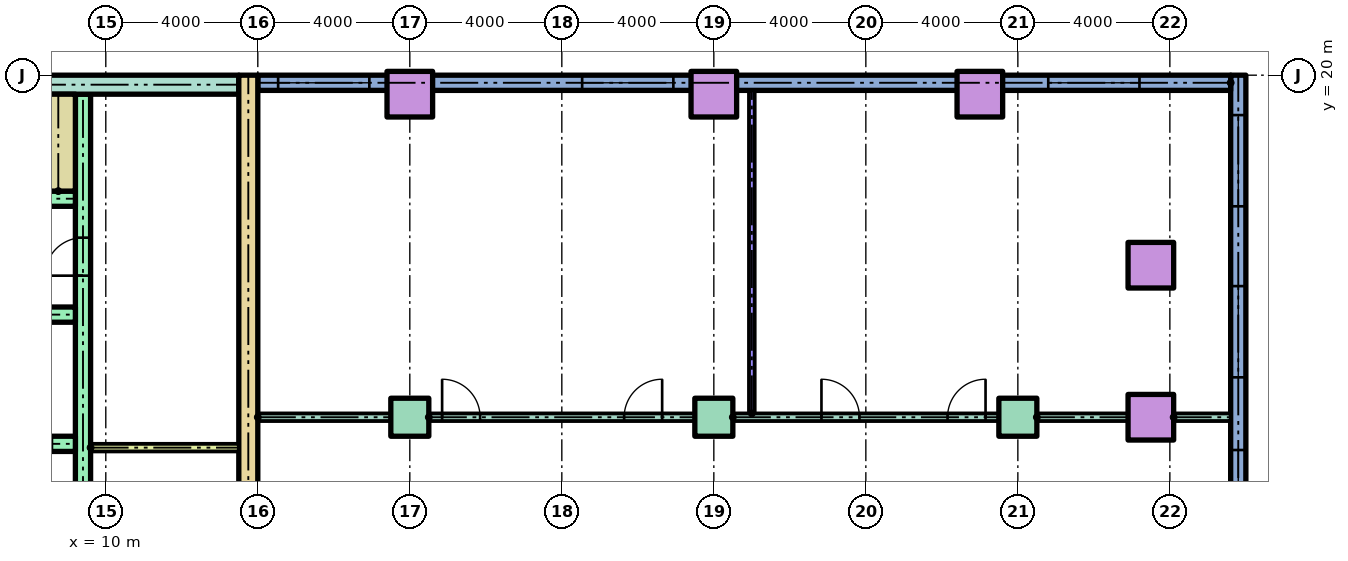
"""IFC4 building model, lengths in metres.
Left out: names, types, materials, properties, quantities, classifications, styles, units other than length and angle.
Written with IfcOpenShell. Run it as: python <this file> out.ifc"""

import sys

from ifc_helpers import new_model, si_unit, direction, frame, frame_2d, origin, origin_2d, place, context, subcontext, project, spatial, rectangle, hollow_rectangle, extrude, element, fill, save


model = new_model("IFC4")
c1 = context("Model", 3, precision=1e-05, world=origin(), true_north=direction((0.0, 1.0)))
c2 = subcontext(c1, "Body", "Model", "MODEL_VIEW")
j1 = project(units=[si_unit("LENGTHUNIT", "METRE"), si_unit("PLANEANGLEUNIT", "RADIAN")], contexts=[c1])
p1 = place(None, origin())
s1 = spatial("IfcSite", under=j1, at=p1, CompositionType="ELEMENT")
p2 = place(p1, origin())
s2 = spatial("IfcBuilding", under=s1, at=p2, CompositionType="ELEMENT")
p3 = place(p2, frame((0.0, 0.0, 18.0)))
s3 = spatial("IfcBuildingStorey", under=s2, at=p3, CompositionType="ELEMENT", Elevation=18.0)
for number, where in (
    (1, (18.0, 11.0, 0.0)),
    (2, (26.0, 11.0, 0.0)),
    (3, (34.0, 11.0, 0.0)),
):
    element("IfcColumn", number, at=place(p3, frame(where)), inside=s3, PredefinedType="COLUMN", context=c2, shape_type="SweptSolid", body=[
        extrude(rectangle(XDim=1.0, YDim=1.0, at=origin_2d()), origin(), (0.0, 0.0, 1.0), 4.0),
    ])
for number, where in (
    (4, (37.5, 11.0, 0.0)),
    (5, (37.5, 15.0, 0.0)),
    (6, (18.0, 19.5, 0.0)),
    (7, (26.0, 19.5, 0.0)),
    (8, (33.0, 19.5, 0.0)),
):
    element("IfcColumn", number, at=place(p3, frame(where)), inside=s3, PredefinedType="COLUMN", context=c2, shape_type="SweptSolid", body=[
        extrude(hollow_rectangle(XDim=1.2, YDim=1.2, WallThickness=0.06, at=origin_2d()), origin(), (0.0, 0.0, 1.0), 4.0),
    ])
p4 = place(p3, frame((39.8, -50.0, 0.0), z_axis=(0.0, 0.0, 1.0), x_axis=(0.0, 1.0, 0.0)))
e9 = element("IfcWall", 9, at=p4, inside=s3, PredefinedType="STANDARD", context=c2, shape_type="SweptSolid", body=[
    extrude(rectangle(XDim=70.0, YDim=0.4, at=frame_2d((35.0, 0.0))), origin(), (0.0, 0.0, 1.0), 3.7),
])
p5 = place(p4, frame((0.75, 0.0, 0.9)))
e10 = element("IfcOpeningElement", 10, at=p5, cuts=e9, PredefinedType="OPENING", context=c2, shape_type="SweptSolid", body=[
    extrude(rectangle(XDim=2.4, YDim=2.1, at=frame_2d((1.2, 1.05))), frame((0.0, 0.21, 0.0), z_axis=(0.0, -1.0, 0.0), x_axis=(1.0, 0.0, 0.0)), (0.0, 0.0, 1.0), 0.42),
])
p6 = place(p4, frame((6.55, 0.0, 0.9)))
e11 = element("IfcOpeningElement", 11, at=p6, cuts=e9, PredefinedType="OPENING", context=c2, shape_type="SweptSolid", body=[
    extrude(rectangle(XDim=2.4, YDim=2.1, at=frame_2d((1.2, 1.05))), frame((0.0, 0.21, 0.0), z_axis=(0.0, -1.0, 0.0), x_axis=(1.0, 0.0, 0.0)), (0.0, 0.0, 1.0), 0.42),
])
p7 = place(p4, frame((10.05, 0.0, 0.9)))
e12 = element("IfcOpeningElement", 12, at=p7, cuts=e9, PredefinedType="OPENING", context=c2, shape_type="SweptSolid", body=[
    extrude(rectangle(XDim=2.4, YDim=2.1, at=frame_2d((1.2, 1.05))), frame((0.0, 0.21, 0.0), z_axis=(0.0, -1.0, 0.0), x_axis=(1.0, 0.0, 0.0)), (0.0, 0.0, 1.0), 0.42),
])
p8 = place(p4, frame((13.55, 0.0, 0.9)))
e13 = element("IfcOpeningElement", 13, at=p8, cuts=e9, PredefinedType="OPENING", context=c2, shape_type="SweptSolid", body=[
    extrude(rectangle(XDim=2.4, YDim=2.1, at=frame_2d((1.2, 1.05))), frame((0.0, 0.21, 0.0), z_axis=(0.0, -1.0, 0.0), x_axis=(1.0, 0.0, 0.0)), (0.0, 0.0, 1.0), 0.42),
])
p9 = place(p4, frame((28.863, 0.0, 0.9)))
e14 = element("IfcOpeningElement", 14, at=p9, cuts=e9, PredefinedType="OPENING", context=c2, shape_type="SweptSolid", body=[
    extrude(rectangle(XDim=2.4, YDim=2.1, at=frame_2d((1.2, 1.05))), frame((0.0, 0.21, 0.0), z_axis=(0.0, -1.0, 0.0), x_axis=(1.0, 0.0, 0.0)), (0.0, 0.0, 1.0), 0.42),
])
p10 = place(p4, frame((32.988, 0.0, 0.9)))
e15 = element("IfcOpeningElement", 15, at=p10, cuts=e9, PredefinedType="OPENING", context=c2, shape_type="SweptSolid", body=[
    extrude(rectangle(XDim=2.4, YDim=2.1, at=frame_2d((1.2, 1.05))), frame((0.0, 0.21, 0.0), z_axis=(0.0, -1.0, 0.0), x_axis=(1.0, 0.0, 0.0)), (0.0, 0.0, 1.0), 0.42),
])
p11 = place(p4, frame((37.113, 0.0, 0.9)))
e16 = element("IfcOpeningElement", 16, at=p11, cuts=e9, PredefinedType="OPENING", context=c2, shape_type="SweptSolid", body=[
    extrude(rectangle(XDim=2.4, YDim=2.1, at=frame_2d((1.2, 1.05))), frame((0.0, 0.21, 0.0), z_axis=(0.0, -1.0, 0.0), x_axis=(1.0, 0.0, 0.0)), (0.0, 0.0, 1.0), 0.42),
])
p12 = place(p4, frame((41.238, 0.0, 0.9)))
e17 = element("IfcOpeningElement", 17, at=p12, cuts=e9, PredefinedType="OPENING", context=c2, shape_type="SweptSolid", body=[
    extrude(rectangle(XDim=2.4, YDim=2.1, at=frame_2d((1.2, 1.05))), frame((0.0, 0.21, 0.0), z_axis=(0.0, -1.0, 0.0), x_axis=(1.0, 0.0, 0.0)), (0.0, 0.0, 1.0), 0.42),
])
p13 = place(p4, frame((45.363, 0.0, 0.9)))
e18 = element("IfcOpeningElement", 18, at=p13, cuts=e9, PredefinedType="OPENING", context=c2, shape_type="SweptSolid", body=[
    extrude(rectangle(XDim=2.4, YDim=2.1, at=frame_2d((1.2, 1.05))), frame((0.0, 0.21, 0.0), z_axis=(0.0, -1.0, 0.0), x_axis=(1.0, 0.0, 0.0)), (0.0, 0.0, 1.0), 0.42),
])
p14 = place(p4, frame((49.488, 0.0, 0.9)))
e19 = element("IfcOpeningElement", 19, at=p14, cuts=e9, PredefinedType="OPENING", context=c2, shape_type="SweptSolid", body=[
    extrude(rectangle(XDim=2.4, YDim=2.1, at=frame_2d((1.2, 1.05))), frame((0.0, 0.21, 0.0), z_axis=(0.0, -1.0, 0.0), x_axis=(1.0, 0.0, 0.0)), (0.0, 0.0, 1.0), 0.42),
])
p15 = place(p4, frame((53.613, 0.0, 0.9)))
e20 = element("IfcOpeningElement", 20, at=p15, cuts=e9, PredefinedType="OPENING", context=c2, shape_type="SweptSolid", body=[
    extrude(rectangle(XDim=2.4, YDim=2.1, at=frame_2d((1.2, 1.05))), frame((0.0, 0.21, 0.0), z_axis=(0.0, -1.0, 0.0), x_axis=(1.0, 0.0, 0.0)), (0.0, 0.0, 1.0), 0.42),
])
p16 = place(p4, frame((57.738, 0.0, 0.9)))
e21 = element("IfcOpeningElement", 21, at=p16, cuts=e9, PredefinedType="OPENING", context=c2, shape_type="SweptSolid", body=[
    extrude(rectangle(XDim=2.4, YDim=2.1, at=frame_2d((1.2, 1.05))), frame((0.0, 0.21, 0.0), z_axis=(0.0, -1.0, 0.0), x_axis=(1.0, 0.0, 0.0)), (0.0, 0.0, 1.0), 0.42),
])
p17 = place(p4, frame((62.05, 0.0, 0.9)))
e22 = element("IfcOpeningElement", 22, at=p17, cuts=e9, PredefinedType="OPENING", context=c2, shape_type="SweptSolid", body=[
    extrude(rectangle(XDim=2.4, YDim=2.1, at=frame_2d((1.2, 1.05))), frame((0.0, 0.21, 0.0), z_axis=(0.0, -1.0, 0.0), x_axis=(1.0, 0.0, 0.0)), (0.0, 0.0, 1.0), 0.42),
])
p18 = place(p4, frame((66.55, 0.0, 0.9)))
e23 = element("IfcOpeningElement", 23, at=p18, cuts=e9, PredefinedType="OPENING", context=c2, shape_type="SweptSolid", body=[
    extrude(rectangle(XDim=2.4, YDim=2.1, at=frame_2d((1.2, 1.05))), frame((0.0, 0.21, 0.0), z_axis=(0.0, -1.0, 0.0), x_axis=(1.0, 0.0, 0.0)), (0.0, 0.0, 1.0), 0.42),
])
p19 = place(p3, frame((39.6, 19.8, 0.0), z_axis=(0.0, 0.0, 1.0), x_axis=(-1.0, 0.0, 0.0)))
e24 = element("IfcWall", 24, at=p19, inside=s3, PredefinedType="STANDARD", context=c2, shape_type="SweptSolid", body=[
    extrude(rectangle(XDim=25.6, YDim=0.4, at=frame_2d((12.8, 0.0))), origin(), (0.0, 0.0, 1.0), 3.7),
])
p20 = place(p19, frame((2.4, 0.0, 0.9)))
e25 = element("IfcOpeningElement", 25, at=p20, cuts=e24, PredefinedType="OPENING", context=c2, shape_type="SweptSolid", body=[
    extrude(rectangle(XDim=2.4, YDim=2.1, at=frame_2d((1.2, 1.05))), frame((0.0, 0.21, 0.0), z_axis=(0.0, -1.0, 0.0), x_axis=(1.0, 0.0, 0.0)), (0.0, 0.0, 1.0), 0.42),
])
p21 = place(p19, frame((14.665, 0.0, 0.9)))
e26 = element("IfcOpeningElement", 26, at=p21, cuts=e24, PredefinedType="OPENING", context=c2, shape_type="SweptSolid", body=[
    extrude(rectangle(XDim=2.4, YDim=2.1, at=frame_2d((1.2, 1.05))), frame((0.0, 0.21, 0.0), z_axis=(0.0, -1.0, 0.0), x_axis=(1.0, 0.0, 0.0)), (0.0, 0.0, 1.0), 0.42),
])
p22 = place(p19, frame((22.665, 0.0, 0.9)))
e27 = element("IfcOpeningElement", 27, at=p22, cuts=e24, PredefinedType="OPENING", context=c2, shape_type="SweptSolid", body=[
    extrude(rectangle(XDim=2.4, YDim=2.1, at=frame_2d((1.2, 1.05))), frame((0.0, 0.21, 0.0), z_axis=(0.0, -1.0, 0.0), x_axis=(1.0, 0.0, 0.0)), (0.0, 0.0, 1.0), 0.42),
])
p23 = place(p3, frame((13.75, 3.0, 0.0), z_axis=(0.0, 0.0, 1.0), x_axis=(0.0, 1.0, 0.0)))
e28 = element("IfcWall", 28, at=p23, inside=s3, PredefinedType="SHEAR", context=c2, shape_type="SweptSolid", body=[
    extrude(rectangle(XDim=17.0, YDim=0.5, at=frame_2d((8.5, 0.0))), origin(), (0.0, 0.0, 1.0), 3.7),
])
p24 = place(p3, frame((-13.5, 19.75, 0.0)))
e29 = element("IfcWall", 29, at=p24, inside=s3, PredefinedType="SHEAR", context=c2, shape_type="SweptSolid", body=[
    extrude(rectangle(XDim=27.0, YDim=0.5, at=frame_2d((13.5, 0.0))), origin(), (0.0, 0.0, 1.0), 3.7),
])
p25 = place(p3, frame((9.4, 6.8, 0.0), z_axis=(0.0, 0.0, 1.0), x_axis=(0.0, 1.0, 0.0)))
e30 = element("IfcWall", 30, at=p25, inside=s3, PredefinedType="SHEAR", context=c2, shape_type="SweptSolid", body=[
    extrude(rectangle(XDim=12.7, YDim=0.4, at=frame_2d((6.35, 0.0))), origin(), (0.0, 0.0, 1.0), 3.7),
])
p26 = place(p25, frame((1.15, 0.0, 0.0)))
e31 = element("IfcOpeningElement", 31, at=p26, cuts=e30, PredefinedType="OPENING", context=c2, shape_type="SweptSolid", body=[
    extrude(rectangle(XDim=1.0, YDim=2.1, at=frame_2d((0.5, 1.05))), frame((0.0, 0.21, 0.0), z_axis=(0.0, -1.0, 0.0), x_axis=(1.0, 0.0, 0.0)), (0.0, 0.0, 1.0), 0.42),
])
p27 = place(p25, frame((7.925, 0.0, 0.0)))
e32 = element("IfcOpeningElement", 32, at=p27, cuts=e30, PredefinedType="OPENING", context=c2, shape_type="SweptSolid", body=[
    extrude(rectangle(XDim=1.0, YDim=2.1, at=frame_2d((0.5, 1.05))), frame((0.0, 0.21, 0.0), z_axis=(0.0, -1.0, 0.0), x_axis=(1.0, 0.0, 0.0)), (0.0, 0.0, 1.0), 0.42),
])
p28 = place(p3, frame((1.2, 10.3, 0.0)))
e33 = element("IfcWall", 33, at=p28, inside=s3, PredefinedType="SHEAR", context=c2, shape_type="SweptSolid", body=[
    extrude(rectangle(XDim=8.0, YDim=0.4, at=frame_2d((4.0, 0.0))), origin(), (0.0, 0.0, 1.0), 3.7),
])
p29 = place(p28, frame((3.55, 0.0, 0.0)))
e34 = element("IfcOpeningElement", 34, at=p29, cuts=e33, PredefinedType="OPENING", context=c2, shape_type="SweptSolid", body=[
    extrude(rectangle(XDim=1.1, YDim=2.1, at=frame_2d((0.55, 1.05))), frame((0.0, 0.21, 0.0), z_axis=(0.0, -1.0, 0.0), x_axis=(1.0, 0.0, 0.0)), (0.0, 0.0, 1.0), 0.42),
])
p30 = place(p28, frame((6.283, 0.0, 0.0)))
e35 = element("IfcOpeningElement", 35, at=p30, cuts=e33, PredefinedType="OPENING", context=c2, shape_type="SweptSolid", body=[
    extrude(rectangle(XDim=1.1, YDim=2.1, at=frame_2d((0.55, 1.05))), frame((0.0, 0.21, 0.0), z_axis=(0.0, -1.0, 0.0), x_axis=(1.0, 0.0, 0.0)), (0.0, 0.0, 1.0), 0.42),
])
p31 = place(p28, frame((0.867, 0.0, 0.0)))
e36 = element("IfcOpeningElement", 36, at=p31, cuts=e33, PredefinedType="OPENING", context=c2, shape_type="SweptSolid", body=[
    extrude(rectangle(XDim=1.0, YDim=2.1, at=frame_2d((0.5, 1.05))), frame((0.0, 0.21, 0.0), z_axis=(0.0, -1.0, 0.0), x_axis=(1.0, 0.0, 0.0)), (0.0, 0.0, 1.0), 0.42),
])
p32 = place(p3, frame((1.2, 13.7, 0.0)))
e37 = element("IfcWall", 37, at=p32, inside=s3, PredefinedType="SHEAR", context=c2, shape_type="SweptSolid", body=[
    extrude(rectangle(XDim=8.0, YDim=0.4, at=frame_2d((4.0, 0.0))), origin(), (0.0, 0.0, 1.0), 3.7),
])
p33 = place(p3, frame((-9.2, 16.75, 0.0)))
e38 = element("IfcWall", 38, at=p33, inside=s3, PredefinedType="SHEAR", context=c2, shape_type="SweptSolid", body=[
    extrude(rectangle(XDim=18.4, YDim=0.4, at=frame_2d((9.2, 0.0))), origin(), (0.0, 0.0, 1.0), 3.7),
])
p34 = place(p33, frame((0.1, 0.0, 0.0)))
e39 = element("IfcOpeningElement", 39, at=p34, cuts=e38, PredefinedType="OPENING", context=c2, shape_type="SweptSolid", body=[
    extrude(rectangle(XDim=0.95, YDim=2.1, at=frame_2d((0.475, 1.05))), frame((0.0, 0.21, 0.0), z_axis=(0.0, -1.0, 0.0), x_axis=(1.0, 0.0, 0.0)), (0.0, 0.0, 1.0), 0.42),
])
p35 = place(p33, frame((6.1, 0.0, 0.0)))
e40 = element("IfcOpeningElement", 40, at=p35, cuts=e38, PredefinedType="OPENING", context=c2, shape_type="SweptSolid", body=[
    extrude(rectangle(XDim=0.95, YDim=2.1, at=frame_2d((0.475, 1.05))), frame((0.0, 0.21, 0.0), z_axis=(0.0, -1.0, 0.0), x_axis=(1.0, 0.0, 0.0)), (0.0, 0.0, 1.0), 0.42),
])
p36 = place(p33, frame((12.1, 0.0, 0.0)))
e41 = element("IfcOpeningElement", 41, at=p36, cuts=e38, PredefinedType="OPENING", context=c2, shape_type="SweptSolid", body=[
    extrude(rectangle(XDim=0.95, YDim=2.1, at=frame_2d((0.475, 1.05))), frame((0.0, 0.21, 0.0), z_axis=(0.0, -1.0, 0.0), x_axis=(1.0, 0.0, 0.0)), (0.0, 0.0, 1.0), 0.42),
])
p37 = place(p3, frame((8.75, 16.95, 0.0), z_axis=(0.0, 0.0, 1.0), x_axis=(0.0, 1.0, 0.0)))
e42 = element("IfcWall", 42, at=p37, inside=s3, PredefinedType="SHEAR", context=c2, shape_type="SweptSolid", body=[
    extrude(rectangle(XDim=2.55, YDim=0.9, at=frame_2d((1.275, 0.0))), origin(), (0.0, 0.0, 1.0), 3.7),
])
p38 = place(p3, frame((9.6, 10.2, 0.0)))
e43 = element("IfcWall", 43, at=p38, inside=s3, PredefinedType="PARTITIONING", context=c2, shape_type="SweptSolid", body=[
    extrude(rectangle(XDim=3.9, YDim=0.2, at=frame_2d((1.95, 0.0))), origin(), (0.0, 0.0, 1.0), 3.7),
])
p39 = place(p3, frame((14.0, 11.0, 0.0)))
e44 = element("IfcWall", 44, at=p39, inside=s3, PredefinedType="PARTITIONING", context=c2, shape_type="SweptSolid", body=[
    extrude(rectangle(XDim=3.5, YDim=0.2, at=frame_2d((1.75, 0.0))), origin(), (0.0, 0.0, 1.0), 3.7),
])
p40 = place(p3, frame((18.5, 11.0, 0.0)))
e45 = element("IfcWall", 45, at=p40, inside=s3, PredefinedType="PARTITIONING", context=c2, shape_type="SweptSolid", body=[
    extrude(rectangle(XDim=7.0, YDim=0.2, at=frame_2d((3.5, 0.0))), origin(), (0.0, 0.0, 1.0), 3.7),
])
p41 = place(p40, frame((0.35, 0.0, 0.0)))
e46 = element("IfcOpeningElement", 46, at=p41, cuts=e45, PredefinedType="OPENING", context=c2, shape_type="SweptSolid", body=[
    extrude(rectangle(XDim=1.0, YDim=2.1, at=frame_2d((0.5, 1.05))), frame((0.0, 0.11, 0.0), z_axis=(0.0, -1.0, 0.0), x_axis=(1.0, 0.0, 0.0)), (0.0, 0.0, 1.0), 0.22),
])
p42 = place(p40, frame((5.14, 0.0, 0.0)))
e47 = element("IfcOpeningElement", 47, at=p42, cuts=e45, PredefinedType="OPENING", context=c2, shape_type="SweptSolid", body=[
    extrude(rectangle(XDim=1.0, YDim=2.1, at=frame_2d((0.5, 1.05))), frame((0.0, 0.11, 0.0), z_axis=(0.0, -1.0, 0.0), x_axis=(1.0, 0.0, 0.0)), (0.0, 0.0, 1.0), 0.22),
])
p43 = place(p3, frame((26.5, 11.0, 0.0)))
e48 = element("IfcWall", 48, at=p43, inside=s3, PredefinedType="PARTITIONING", context=c2, shape_type="SweptSolid", body=[
    extrude(rectangle(XDim=7.0, YDim=0.2, at=frame_2d((3.5, 0.0))), origin(), (0.0, 0.0, 1.0), 3.7),
])
p44 = place(p43, frame((2.332, 0.0, 0.0)))
e49 = element("IfcOpeningElement", 49, at=p44, cuts=e48, PredefinedType="OPENING", context=c2, shape_type="SweptSolid", body=[
    extrude(rectangle(XDim=1.0, YDim=2.1, at=frame_2d((0.5, 1.05))), frame((0.0, 0.11, 0.0), z_axis=(0.0, -1.0, 0.0), x_axis=(1.0, 0.0, 0.0)), (0.0, 0.0, 1.0), 0.22),
])
p45 = place(p43, frame((5.65, 0.0, 0.0)))
e50 = element("IfcOpeningElement", 50, at=p45, cuts=e48, PredefinedType="OPENING", context=c2, shape_type="SweptSolid", body=[
    extrude(rectangle(XDim=1.0, YDim=2.1, at=frame_2d((0.5, 1.05))), frame((0.0, 0.11, 0.0), z_axis=(0.0, -1.0, 0.0), x_axis=(1.0, 0.0, 0.0)), (0.0, 0.0, 1.0), 0.22),
])
p46 = place(p3, frame((34.5, 11.0, 0.0)))
e51 = element("IfcWall", 51, at=p46, inside=s3, PredefinedType="PARTITIONING", context=c2, shape_type="SweptSolid", body=[
    extrude(rectangle(XDim=2.4, YDim=0.2, at=frame_2d((1.2, 0.0))), origin(), (0.0, 0.0, 1.0), 3.7),
])
p47 = place(p3, frame((38.1, 11.0, 0.0)))
e52 = element("IfcWall", 52, at=p47, inside=s3, PredefinedType="PARTITIONING", context=c2, shape_type="SweptSolid", body=[
    extrude(rectangle(XDim=1.5, YDim=0.2, at=frame_2d((0.75, 0.0))), origin(), (0.0, 0.0, 1.0), 3.7),
])
p48 = place(p3, frame((27.0, 11.1, 0.0), z_axis=(0.0, 0.0, 1.0), x_axis=(0.0, 1.0, 0.0)))
e53 = element("IfcWall", 53, at=p48, inside=s3, PredefinedType="PARTITIONING", context=c2, shape_type="SweptSolid", body=[
    extrude(rectangle(XDim=8.5, YDim=0.15, at=frame_2d((4.25, 0.0))), origin(), (0.0, 0.0, 1.0), 3.7),
])
p49 = place(p16, origin())
e54 = element("IfcWindow", 54, at=p49, inside=s3, PartitioningType="SINGLE_PANEL", PredefinedType="WINDOW", context=c2, shape_type="SweptSolid", body=[
    extrude(rectangle(XDim=2.4, YDim=2.1, at=frame_2d((1.2, 1.05))), frame((0.0, 0.03, 0.0), z_axis=(0.0, -1.0, 0.0), x_axis=(1.0, 0.0, 0.0)), (0.0, 0.0, 1.0), 0.06),
])
fill(e21, e54)
p50 = place(p17, origin())
e55 = element("IfcWindow", 55, at=p50, inside=s3, PartitioningType="SINGLE_PANEL", PredefinedType="WINDOW", context=c2, shape_type="SweptSolid", body=[
    extrude(rectangle(XDim=2.4, YDim=2.1, at=frame_2d((1.2, 1.05))), frame((0.0, 0.03, 0.0), z_axis=(0.0, -1.0, 0.0), x_axis=(1.0, 0.0, 0.0)), (0.0, 0.0, 1.0), 0.06),
])
fill(e22, e55)
p51 = place(p18, origin())
e56 = element("IfcWindow", 56, at=p51, inside=s3, PartitioningType="SINGLE_PANEL", PredefinedType="WINDOW", context=c2, shape_type="SweptSolid", body=[
    extrude(rectangle(XDim=2.4, YDim=2.1, at=frame_2d((1.2, 1.05))), frame((0.0, 0.03, 0.0), z_axis=(0.0, -1.0, 0.0), x_axis=(1.0, 0.0, 0.0)), (0.0, 0.0, 1.0), 0.06),
])
fill(e23, e56)
p52 = place(p20, origin())
e57 = element("IfcWindow", 57, at=p52, inside=s3, PartitioningType="SINGLE_PANEL", PredefinedType="WINDOW", context=c2, shape_type="SweptSolid", body=[
    extrude(rectangle(XDim=2.4, YDim=2.1, at=frame_2d((1.2, 1.05))), frame((0.0, 0.03, 0.0), z_axis=(0.0, -1.0, 0.0), x_axis=(1.0, 0.0, 0.0)), (0.0, 0.0, 1.0), 0.06),
])
fill(e25, e57)
p53 = place(p21, origin())
e58 = element("IfcWindow", 58, at=p53, inside=s3, PartitioningType="SINGLE_PANEL", PredefinedType="WINDOW", context=c2, shape_type="SweptSolid", body=[
    extrude(rectangle(XDim=2.4, YDim=2.1, at=frame_2d((1.2, 1.05))), frame((0.0, 0.03, 0.0), z_axis=(0.0, -1.0, 0.0), x_axis=(1.0, 0.0, 0.0)), (0.0, 0.0, 1.0), 0.06),
])
fill(e26, e58)
p54 = place(p22, origin())
e59 = element("IfcWindow", 59, at=p54, inside=s3, PartitioningType="SINGLE_PANEL", PredefinedType="WINDOW", context=c2, shape_type="SweptSolid", body=[
    extrude(rectangle(XDim=2.4, YDim=2.1, at=frame_2d((1.2, 1.05))), frame((0.0, 0.03, 0.0), z_axis=(0.0, -1.0, 0.0), x_axis=(1.0, 0.0, 0.0)), (0.0, 0.0, 1.0), 0.06),
])
fill(e27, e59)
p55 = place(p27, origin())
e60 = element("IfcDoor", 60, at=p55, inside=s3, OperationType="SINGLE_SWING_LEFT", PredefinedType="DOOR", context=c2, shape_type="SweptSolid", body=[
    extrude(rectangle(XDim=1.0, YDim=2.1, at=frame_2d((0.5, 1.05))), frame((0.0, 0.025, 0.0), z_axis=(0.0, -1.0, 0.0), x_axis=(1.0, 0.0, 0.0)), (0.0, 0.0, 1.0), 0.05),
])
fill(e32, e60)
p56 = place(p41, origin())
e61 = element("IfcDoor", 61, at=p56, inside=s3, OperationType="SINGLE_SWING_LEFT", PredefinedType="DOOR", context=c2, shape_type="SweptSolid", body=[
    extrude(rectangle(XDim=1.0, YDim=2.1, at=frame_2d((0.5, 1.05))), frame((0.0, 0.025, 0.0), z_axis=(0.0, -1.0, 0.0), x_axis=(1.0, 0.0, 0.0)), (0.0, 0.0, 1.0), 0.05),
])
fill(e46, e61)
p57 = place(p42, origin())
e62 = element("IfcDoor", 62, at=p57, inside=s3, OperationType="SINGLE_SWING_RIGHT", PredefinedType="DOOR", context=c2, shape_type="SweptSolid", body=[
    extrude(rectangle(XDim=1.0, YDim=2.1, at=frame_2d((0.5, 1.05))), frame((0.0, 0.025, 0.0), z_axis=(0.0, -1.0, 0.0), x_axis=(1.0, 0.0, 0.0)), (0.0, 0.0, 1.0), 0.05),
])
fill(e47, e62)
p58 = place(p44, origin())
e63 = element("IfcDoor", 63, at=p58, inside=s3, OperationType="SINGLE_SWING_LEFT", PredefinedType="DOOR", context=c2, shape_type="SweptSolid", body=[
    extrude(rectangle(XDim=1.0, YDim=2.1, at=frame_2d((0.5, 1.05))), frame((0.0, 0.025, 0.0), z_axis=(0.0, -1.0, 0.0), x_axis=(1.0, 0.0, 0.0)), (0.0, 0.0, 1.0), 0.05),
])
fill(e49, e63)
p59 = place(p45, origin())
e64 = element("IfcDoor", 64, at=p59, inside=s3, OperationType="SINGLE_SWING_RIGHT", PredefinedType="DOOR", context=c2, shape_type="SweptSolid", body=[
    extrude(rectangle(XDim=1.0, YDim=2.1, at=frame_2d((0.5, 1.05))), frame((0.0, 0.025, 0.0), z_axis=(0.0, -1.0, 0.0), x_axis=(1.0, 0.0, 0.0)), (0.0, 0.0, 1.0), 0.05),
])
fill(e50, e64)
save(model, sys.argv[1])
